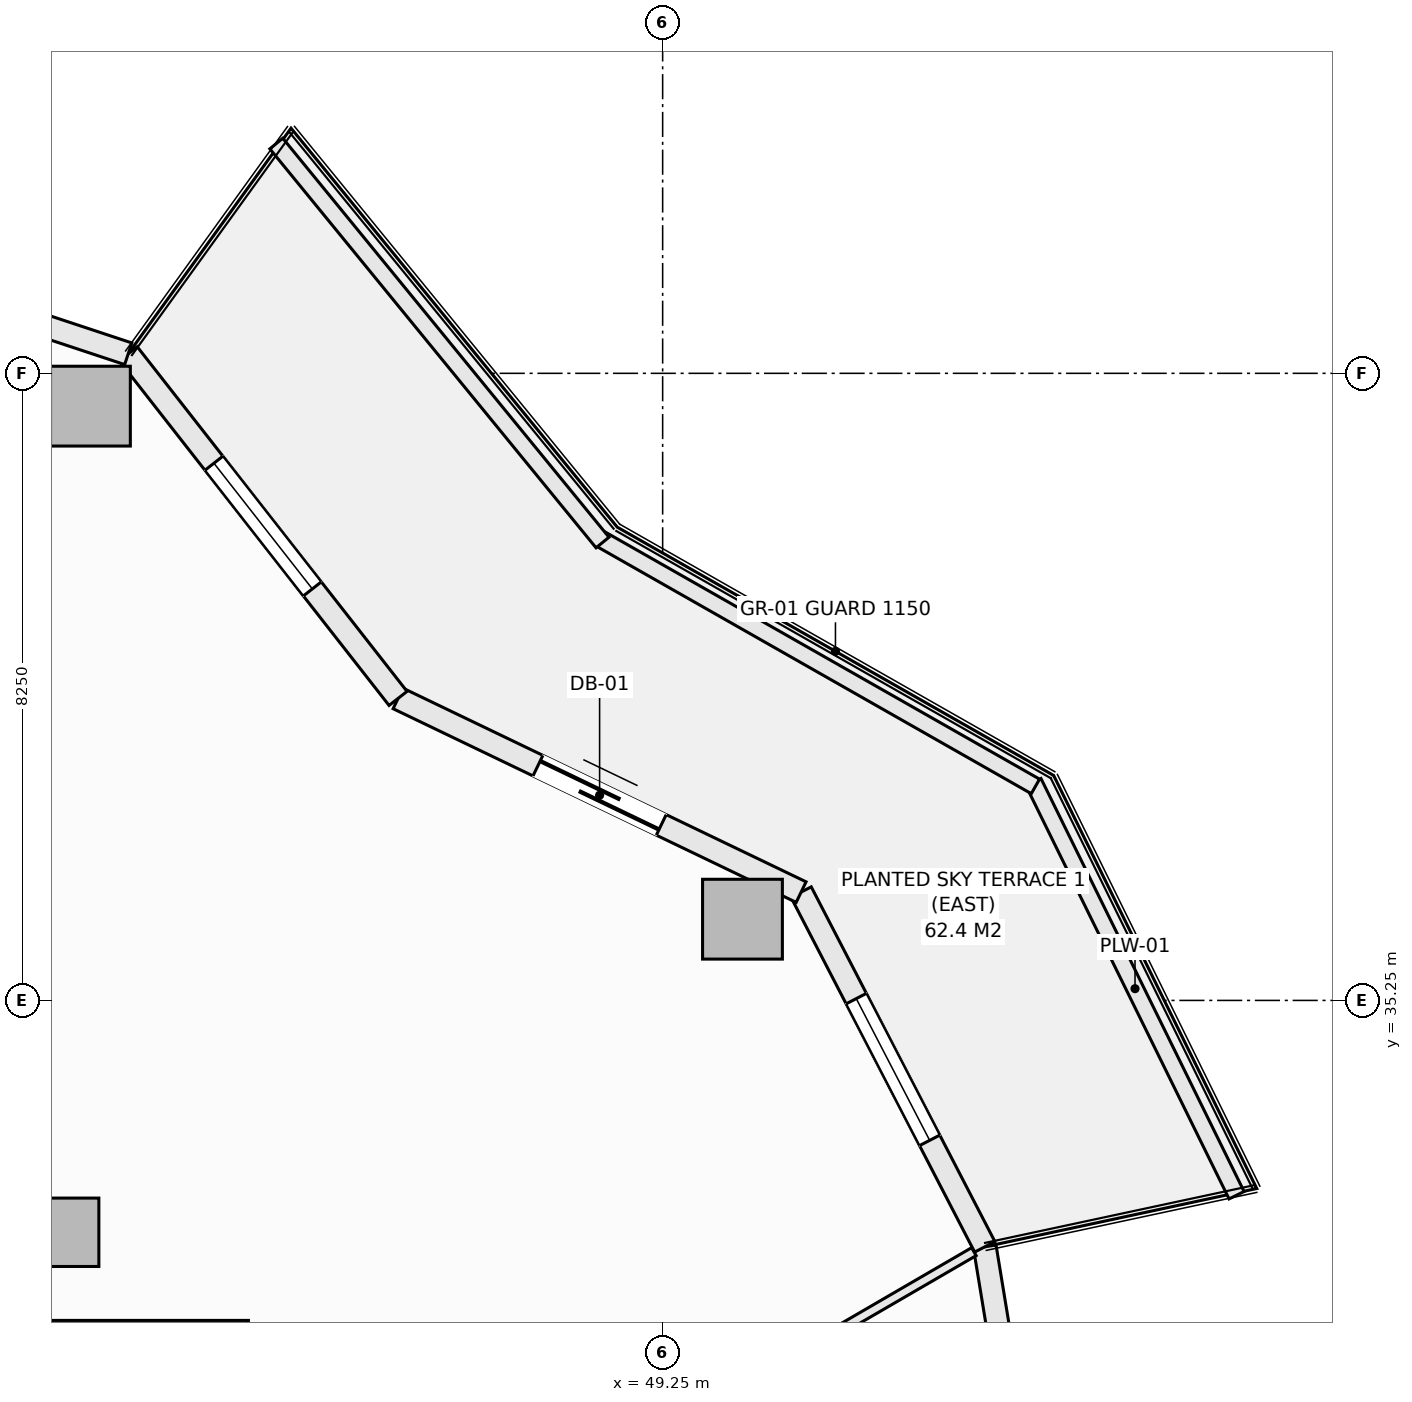
"""IFC4 building model, lengths in metres.
Left out: names, types, materials, properties, quantities, classifications, styles, units other than length and angle.
Written with IfcOpenShell. Run it as: python <this file> out.ifc"""

import sys

from ifc_helpers import new_model, si_unit, direction, frame, frame_2d, origin, origin_2d, place, context, subcontext, project, spatial, rectangle, extrude, element, fill, save


model = new_model("IFC4")
c1 = context("Model", 3, precision=1e-05, world=origin(), true_north=direction((0.0, 1.0)))
c2 = subcontext(c1, "Body", "Model", "MODEL_VIEW")
j1 = project(units=[si_unit("LENGTHUNIT", "METRE"), si_unit("PLANEANGLEUNIT", "RADIAN")], contexts=[c1])
p1 = place(None, origin())
s1 = spatial("IfcSite", under=j1, at=p1, CompositionType="ELEMENT")
p2 = place(p1, origin())
s2 = spatial("IfcBuilding", under=s1, at=p2, CompositionType="ELEMENT")
p3 = place(p2, frame((0.0, 0.0, 105.3)))
s3 = spatial("IfcBuildingStorey", under=s2, at=p3, CompositionType="ELEMENT", Elevation=105.3)
for number, where, z_axis, x_axis in (
    (1, (50.3, 36.319, -0.27), (0.0, 0.0, 1.0), (1.0, 0.0, 0.0)),
    (2, (41.721, 43.068, -0.27), (0.0, 0.0, 1.0), (1.0, 0.0, 0.0)),
):
    element("IfcColumn", number, at=place(p3, frame(where, z_axis=z_axis, x_axis=x_axis)), inside=s3, PredefinedType="COLUMN", context=c2, shape_type="SweptSolid", body=[
        extrude(rectangle(XDim=1.05, YDim=1.05, at=origin_2d()), origin(), (0.0, 0.0, 1.0), 3.4),
    ])
p4 = place(p3, frame((41.382, 32.199, -0.27), z_axis=(0.0, 0.0, 1.0), x_axis=(1.0, 0.0, 0.0)))
e3 = element("IfcColumn", 3, at=p4, inside=s3, PredefinedType="COLUMN", context=c2, shape_type="SweptSolid", body=[
    extrude(rectangle(XDim=0.9, YDim=0.9, at=origin_2d()), origin(), (0.0, 0.0, 1.0), 3.4),
])
p5 = place(p3, frame((53.488, 32.008, 0.0), z_axis=(0.0, 0.0, 1.0), x_axis=(0.162393944769, -0.986726003864, 0.0)))
e4 = element("IfcWall", 4, at=p5, inside=s3, PredefinedType="SOLIDWALL", context=c2, shape_type="SweptSolid", body=[
    extrude(rectangle(XDim=5.075, YDim=0.3, at=frame_2d((2.538, 0.0))), origin(), (0.0, 0.0, 1.0), 2.653),
])
p6 = place(p5, frame((1.488, 0.0, 0.74)))
e5 = element("IfcOpeningElement", 5, at=p6, cuts=e4, PredefinedType="OPENING", context=c2, shape_type="SweptSolid", body=[
    extrude(rectangle(XDim=2.1, YDim=1.7, at=frame_2d((1.05, 0.85))), frame((0.0, 0.16, 0.0), z_axis=(0.0, -1.0, 0.0), x_axis=(1.0, 0.0, 0.0)), (0.0, 0.0, 1.0), 0.32),
])
p7 = place(p3, frame((51.072, 36.675, 0.0), z_axis=(0.0, 0.0, 1.0), x_axis=(0.459767899643, -0.888039119892, 0.0)))
e6 = element("IfcWall", 6, at=p7, inside=s3, PredefinedType="SOLIDWALL", context=c2, shape_type="SweptSolid", body=[
    extrude(rectangle(XDim=5.255, YDim=0.3, at=frame_2d((2.628, 0.0))), origin(), (0.0, 0.0, 1.0), 2.653),
])
p8 = place(p7, frame((1.578, 0.0, 0.74)))
e7 = element("IfcOpeningElement", 7, at=p8, cuts=e6, PredefinedType="OPENING", context=c2, shape_type="SweptSolid", body=[
    extrude(rectangle(XDim=2.1, YDim=1.7, at=frame_2d((1.05, 0.85))), frame((0.0, 0.16, 0.0), z_axis=(0.0, -1.0, 0.0), x_axis=(1.0, 0.0, 0.0)), (0.0, 0.0, 1.0), 0.32),
])
p9 = place(p3, frame((45.769, 39.223, 0.0), z_axis=(0.0, 0.0, 1.0), x_axis=(0.901370184739, -0.433049408339, 0.0)))
e8 = element("IfcWall", 8, at=p9, inside=s3, PredefinedType="SOLIDWALL", context=c2, shape_type="SweptSolid", body=[
    extrude(rectangle(XDim=5.884, YDim=0.3, at=frame_2d((2.942, 0.0))), origin(), (0.0, 0.0, 1.0), 2.653),
])
p10 = place(p9, frame((2.042, 0.0, 0.0)))
e9 = element("IfcOpeningElement", 9, at=p10, cuts=e8, PredefinedType="OPENING", context=c2, shape_type="SweptSolid", body=[
    extrude(rectangle(XDim=1.8, YDim=2.25, at=frame_2d((0.9, 1.125))), frame((0.0, 0.16, 0.0), z_axis=(0.0, -1.0, 0.0), x_axis=(1.0, 0.0, 0.0)), (0.0, 0.0, 1.0), 0.32),
])
p11 = place(p3, frame((42.219, 43.758, 0.0), z_axis=(0.0, 0.0, 1.0), x_axis=(0.616435134162, -0.787405693001, 0.0)))
e10 = element("IfcWall", 10, at=p11, inside=s3, PredefinedType="SOLIDWALL", context=c2, shape_type="SweptSolid", body=[
    extrude(rectangle(XDim=5.759, YDim=0.3, at=frame_2d((2.879, 0.0))), origin(), (0.0, 0.0, 1.0), 2.653),
])
p12 = place(p11, frame((1.829, 0.0, 0.74)))
e11 = element("IfcOpeningElement", 11, at=p12, cuts=e10, PredefinedType="OPENING", context=c2, shape_type="SweptSolid", body=[
    extrude(rectangle(XDim=2.1, YDim=1.7, at=frame_2d((1.05, 0.85))), frame((0.0, 0.16, 0.0), z_axis=(0.0, -1.0, 0.0), x_axis=(1.0, 0.0, 0.0)), (0.0, 0.0, 1.0), 0.32),
])
p13 = place(p3, frame((36.385, 45.691, 0.0), z_axis=(0.0, 0.0, 1.0), x_axis=(0.949238009374, -0.314558741032, 0.0)))
e12 = element("IfcWall", 12, at=p13, inside=s3, PredefinedType="SOLIDWALL", context=c2, shape_type="SweptSolid", body=[
    extrude(rectangle(XDim=6.146, YDim=0.3, at=frame_2d((3.073, 0.0))), origin(), (0.0, 0.0, 1.0), 2.653),
])
p14 = place(p13, frame((2.023, 0.0, 0.74)))
e13 = element("IfcOpeningElement", 13, at=p14, cuts=e12, PredefinedType="OPENING", context=c2, shape_type="SweptSolid", body=[
    extrude(rectangle(XDim=2.1, YDim=1.7, at=frame_2d((1.05, 0.85))), frame((0.0, 0.16, 0.0), z_axis=(0.0, -1.0, 0.0), x_axis=(1.0, 0.0, 0.0)), (0.0, 0.0, 1.0), 0.32),
])
p15 = place(p3, frame((54.129, 38.122, 0.0), z_axis=(0.0, 0.0, 1.0), x_axis=(0.441269631716, -0.897374566235, 0.0)))
e14 = element("IfcWall", 14, at=p15, inside=s3, PredefinedType="PARAPET", context=c2, shape_type="SweptSolid", body=[
    extrude(rectangle(XDim=6.056, YDim=0.22, at=frame_2d((3.028, 0.0))), origin(), (0.0, 0.0, 1.0), 0.52),
])
p16 = place(p3, frame((48.413, 41.332, 0.0), z_axis=(0.0, 0.0, 1.0), x_axis=(0.869187658335, -0.494482370361, 0.0)))
e15 = element("IfcWall", 15, at=p16, inside=s3, PredefinedType="PARAPET", context=c2, shape_type="SweptSolid", body=[
    extrude(rectangle(XDim=6.606, YDim=0.22, at=frame_2d((3.303, 0.0))), origin(), (0.0, 0.0, 1.0), 0.52),
])
p17 = place(p3, frame((44.167, 46.523, 0.0), z_axis=(0.0, 0.0, 1.0), x_axis=(0.633002467947, -0.77414977593, 0.0)))
e16 = element("IfcWall", 16, at=p17, inside=s3, PredefinedType="PARAPET", context=c2, shape_type="SweptSolid", body=[
    extrude(rectangle(XDim=6.78, YDim=0.22, at=frame_2d((3.39, 0.0))), origin(), (0.0, 0.0, 1.0), 0.52),
])
p18 = place(p3, frame((39.0, 30.98, 0.0), z_axis=(0.0, 0.0, 1.0), x_axis=(1.0, 0.0, 0.0)))
e17 = element("IfcWall", 17, at=p18, inside=s3, PredefinedType="PARTITIONING", context=c2, shape_type="SweptSolid", body=[
    extrude(rectangle(XDim=4.8, YDim=0.12, at=frame_2d((2.4, 0.0))), origin(), (0.0, 0.0, 1.0), 3.13),
])
p19 = place(p3, frame((38.962, 23.589, 0.0), z_axis=(0.0, 0.0, 1.0), x_axis=(0.864680370076, 0.502322463768, 0.0)))
e18 = element("IfcWall", 18, at=p19, inside=s3, PredefinedType="PARTITIONING", context=c2, shape_type="SweptSolid", body=[
    extrude(rectangle(XDim=16.634, YDim=0.12, at=frame_2d((8.317, 0.0))), origin(), (0.0, 0.0, 1.0), 2.505),
])
p20 = place(p8, origin())
e19 = element("IfcWindow", 19, at=p20, inside=s3, PartitioningType="SINGLE_PANEL", PredefinedType="WINDOW", context=c2, shape_type="SweptSolid", body=[
    extrude(rectangle(XDim=2.1, YDim=1.7, at=frame_2d((1.05, 0.85))), frame((0.0, 0.03, 0.0), z_axis=(0.0, -1.0, 0.0), x_axis=(1.0, 0.0, 0.0)), (0.0, 0.0, 1.0), 0.06),
])
fill(e7, e19)
p21 = place(p10, origin())
e20 = element("IfcDoor", 20, at=p21, inside=s3, OperationType="SLIDING_TO_LEFT", PredefinedType="DOOR", context=c2, shape_type="SweptSolid", body=[
    extrude(rectangle(XDim=1.8, YDim=2.25, at=frame_2d((0.9, 1.125))), frame((0.0, 0.025, 0.0), z_axis=(0.0, -1.0, 0.0), x_axis=(1.0, 0.0, 0.0)), (0.0, 0.0, 1.0), 0.05),
])
fill(e9, e20)
p22 = place(p12, origin())
e21 = element("IfcWindow", 21, at=p22, inside=s3, PartitioningType="SINGLE_PANEL", PredefinedType="WINDOW", context=c2, shape_type="SweptSolid", body=[
    extrude(rectangle(XDim=2.1, YDim=1.7, at=frame_2d((1.05, 0.85))), frame((0.0, 0.03, 0.0), z_axis=(0.0, -1.0, 0.0), x_axis=(1.0, 0.0, 0.0)), (0.0, 0.0, 1.0), 0.06),
])
fill(e11, e21)
save(model, sys.argv[1])
